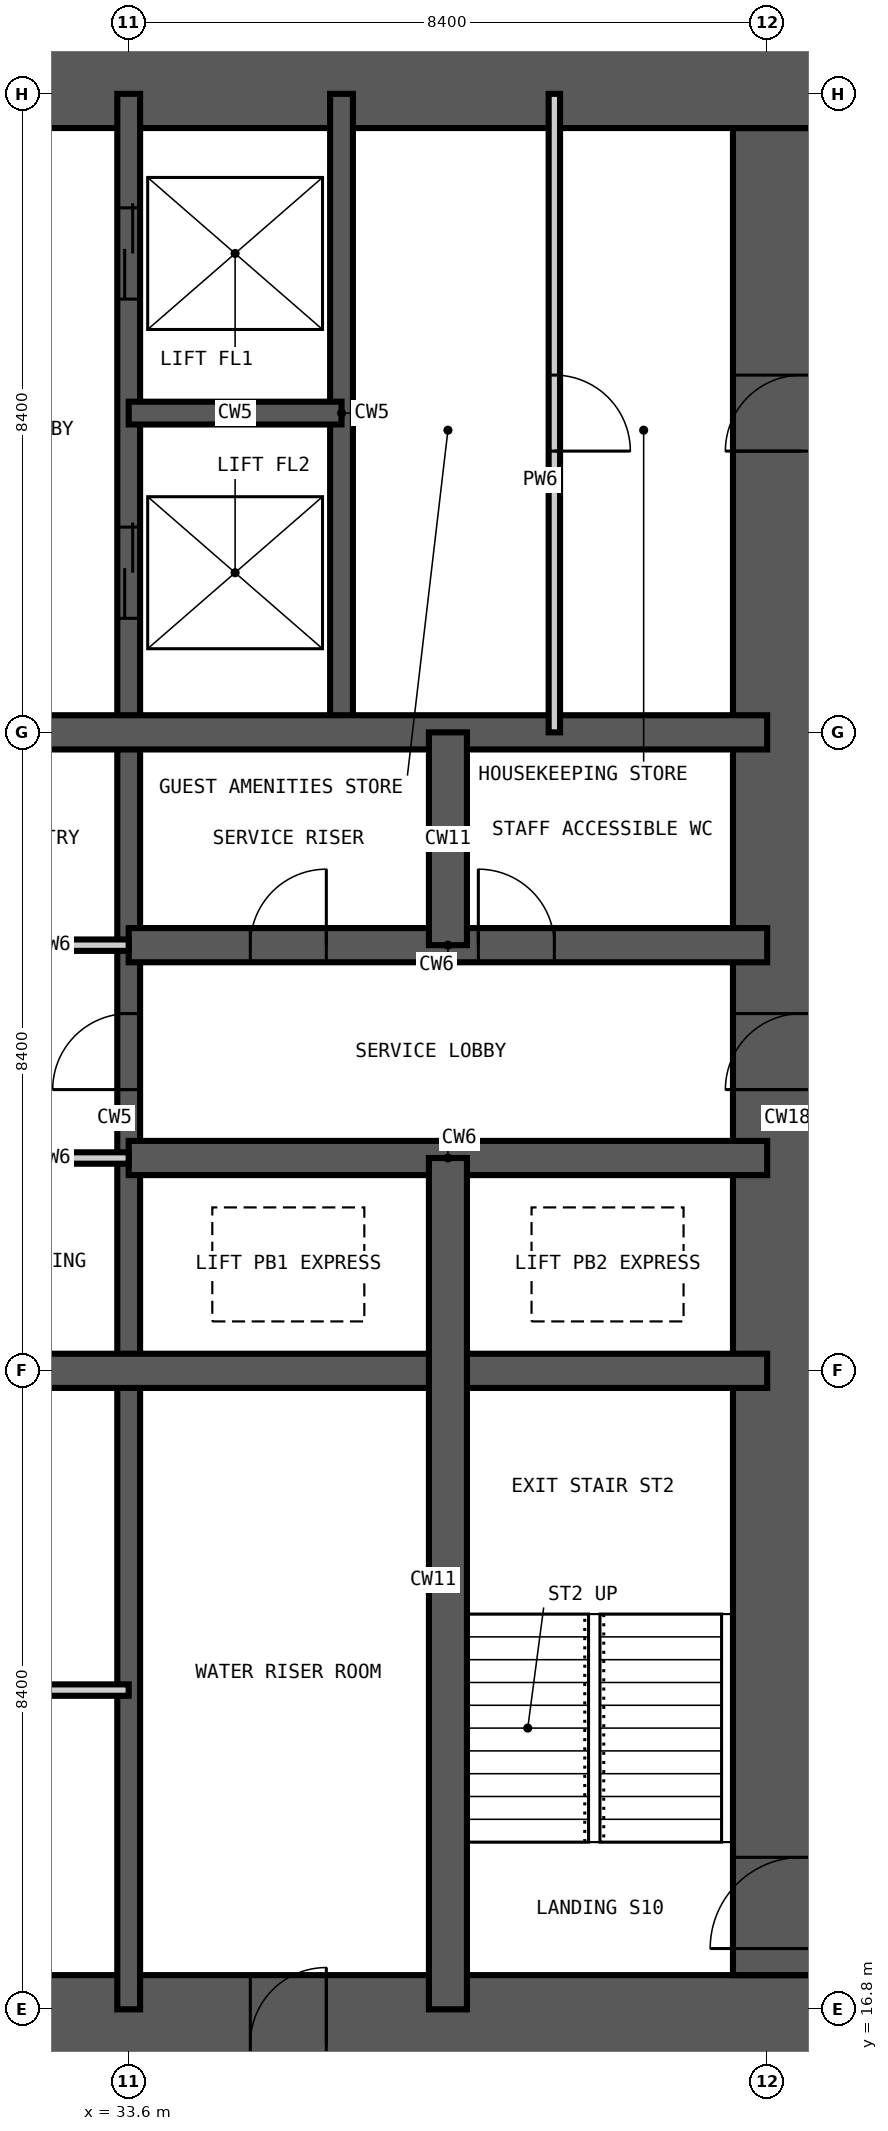
"""IFC4 building model, lengths in metres.
Left out: names, types, materials, properties, quantities, classifications, styles, units other than length and angle.
Written with IfcOpenShell. Run it as: python <this file> out.ifc"""

import sys

from ifc_helpers import new_model, si_unit, direction, frame, frame_2d, origin, place, context, subcontext, project, spatial, rectangle, extrude, element, fill, save


model = new_model("IFC4")
c1 = context("Model", 3, precision=1e-05, world=origin(), true_north=direction((0.0, 1.0)))
c2 = subcontext(c1, "Body", "Model", "MODEL_VIEW")
j1 = project(units=[si_unit("LENGTHUNIT", "METRE"), si_unit("PLANEANGLEUNIT", "RADIAN")], contexts=[c1])
p1 = place(None, origin())
s1 = spatial("IfcSite", under=j1, at=p1, CompositionType="ELEMENT")
p2 = place(p1, origin())
s2 = spatial("IfcBuilding", under=s1, at=p2, CompositionType="ELEMENT")
p3 = place(p2, frame((0.0, 0.0, 34.2)))
s3 = spatial("IfcBuildingStorey", under=s2, at=p3, CompositionType="ELEMENT", Elevation=34.2)
p4 = place(p3, frame((15.45, 16.35, -0.35), z_axis=(0.0, 0.0, 1.0), x_axis=(1.0, 0.0, 0.0)))
e1 = element("IfcWall", 1, at=p4, inside=s3, PredefinedType="SHEAR", context=c2, shape_type="SweptSolid", body=[
    extrude(rectangle(XDim=27.9, YDim=1.8, at=frame_2d((13.95, 0.0))), origin(), (0.0, 0.0, 1.0), 3.6),
])
p5 = place(p4, frame((13.45, 0.0, 0.35)))
e2 = element("IfcOpeningElement", 2, at=p5, cuts=e1, PredefinedType="OPENING", context=c2, shape_type="SweptSolid", body=[
    extrude(rectangle(XDim=1.0, YDim=2.1, at=frame_2d((0.5, 1.05))), frame((0.0, 0.91, 0.0), z_axis=(0.0, -1.0, 0.0), x_axis=(1.0, 0.0, 0.0)), (0.0, 0.0, 1.0), 1.82),
])
p6 = place(p4, frame((19.75, 0.0, 0.35)))
e3 = element("IfcOpeningElement", 3, at=p6, cuts=e1, PredefinedType="OPENING", context=c2, shape_type="SweptSolid", body=[
    extrude(rectangle(XDim=1.0, YDim=2.1, at=frame_2d((0.5, 1.05))), frame((0.0, 0.91, 0.0), z_axis=(0.0, -1.0, 0.0), x_axis=(1.0, 0.0, 0.0)), (0.0, 0.0, 1.0), 1.82),
])
p7 = place(p3, frame((42.45, 17.25, -0.35), z_axis=(0.0, 0.0, 1.0), x_axis=(0.0, 1.0, 0.0)))
e4 = element("IfcWall", 4, at=p7, inside=s3, PredefinedType="SHEAR", context=c2, shape_type="SweptSolid", body=[
    extrude(rectangle(XDim=24.3, YDim=1.8, at=frame_2d((12.15, 0.0))), origin(), (0.0, 0.0, 1.0), 3.6),
])
p8 = place(p7, frame((0.35, 0.0, 0.35)))
e5 = element("IfcOpeningElement", 5, at=p8, cuts=e4, PredefinedType="OPENING", context=c2, shape_type="SweptSolid", body=[
    extrude(rectangle(XDim=1.2, YDim=2.2, at=frame_2d((0.6, 1.1))), frame((0.0, 0.91, 0.0), z_axis=(0.0, -1.0, 0.0), x_axis=(1.0, 0.0, 0.0)), (0.0, 0.0, 1.0), 1.82),
])
p9 = place(p7, frame((11.65, 0.0, 0.35)))
e6 = element("IfcOpeningElement", 6, at=p9, cuts=e4, PredefinedType="OPENING", context=c2, shape_type="SweptSolid", body=[
    extrude(rectangle(XDim=1.0, YDim=2.1, at=frame_2d((0.5, 1.05))), frame((0.0, 0.91, 0.0), z_axis=(0.0, -1.0, 0.0), x_axis=(1.0, 0.0, 0.0)), (0.0, 0.0, 1.0), 1.82),
])
p10 = place(p7, frame((20.05, 0.0, 0.35)))
e7 = element("IfcOpeningElement", 7, at=p10, cuts=e4, PredefinedType="OPENING", context=c2, shape_type="SweptSolid", body=[
    extrude(rectangle(XDim=1.0, YDim=2.1, at=frame_2d((0.5, 1.05))), frame((0.0, 0.91, 0.0), z_axis=(0.0, -1.0, 0.0), x_axis=(1.0, 0.0, 0.0)), (0.0, 0.0, 1.0), 1.82),
])
p11 = place(p3, frame((43.35, 42.45, -0.35), z_axis=(0.0, 0.0, 1.0), x_axis=(-1.0, 0.0, 0.0)))
e8 = element("IfcWall", 8, at=p11, inside=s3, PredefinedType="SHEAR", context=c2, shape_type="SweptSolid", body=[
    extrude(rectangle(XDim=27.9, YDim=1.8, at=frame_2d((13.95, 0.0))), origin(), (0.0, 0.0, 1.0), 3.6),
])
p12 = place(p11, frame((21.85, 0.0, 0.35)))
e9 = element("IfcOpeningElement", 9, at=p12, cuts=e8, PredefinedType="OPENING", context=c2, shape_type="SweptSolid", body=[
    extrude(rectangle(XDim=1.0, YDim=2.1, at=frame_2d((0.5, 1.05))), frame((0.0, 0.91, 0.0), z_axis=(0.0, -1.0, 0.0), x_axis=(1.0, 0.0, 0.0)), (0.0, 0.0, 1.0), 1.82),
])
p13 = place(p11, frame((11.25, 0.0, 0.35)))
e10 = element("IfcOpeningElement", 10, at=p13, cuts=e8, PredefinedType="OPENING", context=c2, shape_type="SweptSolid", body=[
    extrude(rectangle(XDim=1.2, YDim=2.2, at=frame_2d((0.6, 1.1))), frame((0.0, 0.91, 0.0), z_axis=(0.0, -1.0, 0.0), x_axis=(1.0, 0.0, 0.0)), (0.0, 0.0, 1.0), 1.82),
])
p14 = place(p3, frame((33.6, 16.8, -0.35), z_axis=(0.0, 0.0, 1.0), x_axis=(0.0, 1.0, 0.0)))
e11 = element("IfcWall", 11, at=p14, inside=s3, PredefinedType="SHEAR", context=c2, shape_type="SweptSolid", body=[
    extrude(rectangle(XDim=25.2, YDim=0.3, at=frame_2d((12.6, 0.0))), origin(), (0.0, 0.0, 1.0), 3.6),
])
p15 = place(p14, frame((22.5, 0.0, 0.35)))
e12 = element("IfcOpeningElement", 12, at=p15, cuts=e11, PredefinedType="OPENING", context=c2, shape_type="SweptSolid", body=[
    extrude(rectangle(XDim=1.2, YDim=2.2, at=frame_2d((0.6, 1.1))), frame((0.0, 0.16, 0.0), z_axis=(0.0, -1.0, 0.0), x_axis=(1.0, 0.0, 0.0)), (0.0, 0.0, 1.0), 0.32),
])
p16 = place(p14, frame((18.3, 0.0, 0.35)))
e13 = element("IfcOpeningElement", 13, at=p16, cuts=e11, PredefinedType="OPENING", context=c2, shape_type="SweptSolid", body=[
    extrude(rectangle(XDim=1.2, YDim=2.2, at=frame_2d((0.6, 1.1))), frame((0.0, 0.16, 0.0), z_axis=(0.0, -1.0, 0.0), x_axis=(1.0, 0.0, 0.0)), (0.0, 0.0, 1.0), 0.32),
])
p17 = place(p14, frame((12.1, 0.0, 0.35)))
e14 = element("IfcOpeningElement", 14, at=p17, cuts=e11, PredefinedType="OPENING", context=c2, shape_type="SweptSolid", body=[
    extrude(rectangle(XDim=1.0, YDim=2.1, at=frame_2d((0.5, 1.05))), frame((0.0, 0.16, 0.0), z_axis=(0.0, -1.0, 0.0), x_axis=(1.0, 0.0, 0.0)), (0.0, 0.0, 1.0), 0.32),
])
p18 = place(p3, frame((36.4, 33.6, -0.35), z_axis=(0.0, 0.0, 1.0), x_axis=(0.0, 1.0, 0.0)))
e15 = element("IfcWall", 15, at=p18, inside=s3, PredefinedType="SHEAR", context=c2, shape_type="SweptSolid", body=[
    extrude(rectangle(XDim=8.4, YDim=0.3, at=frame_2d((4.2, 0.0))), origin(), (0.0, 0.0, 1.0), 3.6),
])
p19 = place(p3, frame((33.6, 37.8, -0.35), z_axis=(0.0, 0.0, 1.0), x_axis=(1.0, 0.0, 0.0)))
e16 = element("IfcWall", 16, at=p19, inside=s3, PredefinedType="SHEAR", context=c2, shape_type="SweptSolid", body=[
    extrude(rectangle(XDim=2.8, YDim=0.3, at=frame_2d((1.4, 0.0))), origin(), (0.0, 0.0, 1.0), 3.6),
])
p20 = place(p3, frame((16.8, 25.2, -0.35), z_axis=(0.0, 0.0, 1.0), x_axis=(1.0, 0.0, 0.0)))
e17 = element("IfcWall", 17, at=p20, inside=s3, PredefinedType="SHEAR", context=c2, shape_type="SweptSolid", body=[
    extrude(rectangle(XDim=25.2, YDim=0.45, at=frame_2d((12.6, 0.0))), origin(), (0.0, 0.0, 1.0), 3.6),
])
p21 = place(p3, frame((33.6, 28.0, -0.35), z_axis=(0.0, 0.0, 1.0), x_axis=(1.0, 0.0, 0.0)))
e18 = element("IfcWall", 18, at=p21, inside=s3, PredefinedType="SHEAR", context=c2, shape_type="SweptSolid", body=[
    extrude(rectangle(XDim=8.4, YDim=0.45, at=frame_2d((4.2, 0.0))), origin(), (0.0, 0.0, 1.0), 3.6),
])
p22 = place(p3, frame((33.6, 30.8, -0.35), z_axis=(0.0, 0.0, 1.0), x_axis=(1.0, 0.0, 0.0)))
e19 = element("IfcWall", 19, at=p22, inside=s3, PredefinedType="SHEAR", context=c2, shape_type="SweptSolid", body=[
    extrude(rectangle(XDim=8.4, YDim=0.45, at=frame_2d((4.2, 0.0))), origin(), (0.0, 0.0, 1.0), 3.6),
])
p23 = place(p22, frame((1.6, 0.0, 0.35)))
e20 = element("IfcOpeningElement", 20, at=p23, cuts=e19, PredefinedType="OPENING", context=c2, shape_type="SweptSolid", body=[
    extrude(rectangle(XDim=1.0, YDim=2.1, at=frame_2d((0.5, 1.05))), frame((0.0, 0.235, 0.0), z_axis=(0.0, -1.0, 0.0), x_axis=(1.0, 0.0, 0.0)), (0.0, 0.0, 1.0), 0.47),
])
p24 = place(p22, frame((4.6, 0.0, 0.35)))
e21 = element("IfcOpeningElement", 21, at=p24, cuts=e19, PredefinedType="OPENING", context=c2, shape_type="SweptSolid", body=[
    extrude(rectangle(XDim=1.0, YDim=2.1, at=frame_2d((0.5, 1.05))), frame((0.0, 0.235, 0.0), z_axis=(0.0, -1.0, 0.0), x_axis=(1.0, 0.0, 0.0)), (0.0, 0.0, 1.0), 0.47),
])
p25 = place(p3, frame((16.8, 33.6, -0.35), z_axis=(0.0, 0.0, 1.0), x_axis=(1.0, 0.0, 0.0)))
e22 = element("IfcWall", 22, at=p25, inside=s3, PredefinedType="SHEAR", context=c2, shape_type="SweptSolid", body=[
    extrude(rectangle(XDim=25.2, YDim=0.45, at=frame_2d((12.6, 0.0))), origin(), (0.0, 0.0, 1.0), 3.6),
])
p26 = place(p3, frame((37.8, 16.8, -0.35), z_axis=(0.0, 0.0, 1.0), x_axis=(0.0, 1.0, 0.0)))
e23 = element("IfcWall", 23, at=p26, inside=s3, PredefinedType="SHEAR", context=c2, shape_type="SweptSolid", body=[
    extrude(rectangle(XDim=11.2, YDim=0.5, at=frame_2d((5.6, 0.0))), origin(), (0.0, 0.0, 1.0), 3.6),
])
p27 = place(p3, frame((37.8, 30.8, -0.35), z_axis=(0.0, 0.0, 1.0), x_axis=(0.0, 1.0, 0.0)))
e24 = element("IfcWall", 24, at=p27, inside=s3, PredefinedType="SHEAR", context=c2, shape_type="SweptSolid", body=[
    extrude(rectangle(XDim=2.8, YDim=0.5, at=frame_2d((1.4, 0.0))), origin(), (0.0, 0.0, 1.0), 3.6),
])
p28 = place(p3, frame((39.2, 33.6, 0.0), z_axis=(0.0, 0.0, 1.0), x_axis=(0.0, 1.0, 0.0)))
e25 = element("IfcWall", 25, at=p28, inside=s3, PredefinedType="PARTITIONING", context=c2, shape_type="SweptSolid", body=[
    extrude(rectangle(XDim=8.4, YDim=0.15, at=frame_2d((4.2, 0.0))), origin(), (0.0, 0.0, 1.0), 3.25),
])
p29 = place(p28, frame((3.7, 0.0, 0.0)))
e26 = element("IfcOpeningElement", 26, at=p29, cuts=e25, PredefinedType="OPENING", context=c2, shape_type="SweptSolid", body=[
    extrude(rectangle(XDim=1.0, YDim=2.1, at=frame_2d((0.5, 1.05))), frame((0.0, 0.085, 0.0), z_axis=(0.0, -1.0, 0.0), x_axis=(1.0, 0.0, 0.0)), (0.0, 0.0, 1.0), 0.17),
])
p30 = place(p3, frame((25.2, 21.0, 0.0), z_axis=(0.0, 0.0, 1.0), x_axis=(1.0, 0.0, 0.0)))
e27 = element("IfcWall", 27, at=p30, inside=s3, PredefinedType="PARTITIONING", context=c2, shape_type="SweptSolid", body=[
    extrude(rectangle(XDim=8.4, YDim=0.15, at=frame_2d((4.2, 0.0))), origin(), (0.0, 0.0, 1.0), 3.25),
])
p31 = place(p30, frame((3.7, 0.0, 0.0)))
e28 = element("IfcOpeningElement", 28, at=p31, cuts=e27, PredefinedType="OPENING", context=c2, shape_type="SweptSolid", body=[
    extrude(rectangle(XDim=1.0, YDim=2.1, at=frame_2d((0.5, 1.05))), frame((0.0, 0.085, 0.0), z_axis=(0.0, -1.0, 0.0), x_axis=(1.0, 0.0, 0.0)), (0.0, 0.0, 1.0), 0.17),
])
p32 = place(p3, frame((29.4, 28.0, 0.0), z_axis=(0.0, 0.0, 1.0), x_axis=(1.0, 0.0, 0.0)))
e29 = element("IfcWall", 29, at=p32, inside=s3, PredefinedType="PARTITIONING", context=c2, shape_type="SweptSolid", body=[
    extrude(rectangle(XDim=4.2, YDim=0.15, at=frame_2d((2.1, 0.0))), origin(), (0.0, 0.0, 1.0), 3.25),
])
p33 = place(p32, frame((1.6, 0.0, 0.0)))
e30 = element("IfcOpeningElement", 30, at=p33, cuts=e29, PredefinedType="OPENING", context=c2, shape_type="SweptSolid", body=[
    extrude(rectangle(XDim=1.0, YDim=2.1, at=frame_2d((0.5, 1.05))), frame((0.0, 0.085, 0.0), z_axis=(0.0, -1.0, 0.0), x_axis=(1.0, 0.0, 0.0)), (0.0, 0.0, 1.0), 0.17),
])
p34 = place(p3, frame((29.4, 30.8, 0.0), z_axis=(0.0, 0.0, 1.0), x_axis=(1.0, 0.0, 0.0)))
e31 = element("IfcWall", 31, at=p34, inside=s3, PredefinedType="PARTITIONING", context=c2, shape_type="SweptSolid", body=[
    extrude(rectangle(XDim=4.2, YDim=0.15, at=frame_2d((2.1, 0.0))), origin(), (0.0, 0.0, 1.0), 3.25),
])
p35 = place(p34, frame((1.6, 0.0, 0.0)))
e32 = element("IfcOpeningElement", 32, at=p35, cuts=e31, PredefinedType="OPENING", context=c2, shape_type="SweptSolid", body=[
    extrude(rectangle(XDim=1.0, YDim=2.1, at=frame_2d((0.5, 1.05))), frame((0.0, 0.085, 0.0), z_axis=(0.0, -1.0, 0.0), x_axis=(1.0, 0.0, 0.0)), (0.0, 0.0, 1.0), 0.17),
])
p36 = place(p8, origin())
e33 = element("IfcDoor", 33, at=p36, inside=s3, OperationType="SINGLE_SWING_LEFT", PredefinedType="DOOR", context=c2, shape_type="SweptSolid", body=[
    extrude(rectangle(XDim=1.2, YDim=2.2, at=frame_2d((0.6, 1.1))), frame((0.0, 0.025, 0.0), z_axis=(0.0, -1.0, 0.0), x_axis=(1.0, 0.0, 0.0)), (0.0, 0.0, 1.0), 0.05),
])
fill(e5, e33)
p37 = place(p15, origin())
e34 = element("IfcDoor", 34, at=p37, inside=s3, OperationType="DOUBLE_DOOR_SLIDING", PredefinedType="DOOR", context=c2, shape_type="SweptSolid", body=[
    extrude(rectangle(XDim=1.2, YDim=2.2, at=frame_2d((0.6, 1.1))), frame((0.0, 0.025, 0.0), z_axis=(0.0, -1.0, 0.0), x_axis=(1.0, 0.0, 0.0)), (0.0, 0.0, 1.0), 0.05),
])
fill(e12, e34)
p38 = place(p16, origin())
e35 = element("IfcDoor", 35, at=p38, inside=s3, OperationType="DOUBLE_DOOR_SLIDING", PredefinedType="DOOR", context=c2, shape_type="SweptSolid", body=[
    extrude(rectangle(XDim=1.2, YDim=2.2, at=frame_2d((0.6, 1.1))), frame((0.0, 0.025, 0.0), z_axis=(0.0, -1.0, 0.0), x_axis=(1.0, 0.0, 0.0)), (0.0, 0.0, 1.0), 0.05),
])
fill(e13, e35)
p39 = place(p17, origin())
e36 = element("IfcDoor", 36, at=p39, inside=s3, OperationType="SINGLE_SWING_LEFT", PredefinedType="DOOR", context=c2, shape_type="SweptSolid", body=[
    extrude(rectangle(XDim=1.0, YDim=2.1, at=frame_2d((0.5, 1.05))), frame((0.0, 0.025, 0.0), z_axis=(0.0, -1.0, 0.0), x_axis=(1.0, 0.0, 0.0)), (0.0, 0.0, 1.0), 0.05),
])
fill(e14, e36)
p40 = place(p23, origin())
e37 = element("IfcDoor", 37, at=p40, inside=s3, OperationType="SINGLE_SWING_RIGHT", PredefinedType="DOOR", context=c2, shape_type="SweptSolid", body=[
    extrude(rectangle(XDim=1.0, YDim=2.1, at=frame_2d((0.5, 1.05))), frame((0.0, 0.025, 0.0), z_axis=(0.0, -1.0, 0.0), x_axis=(1.0, 0.0, 0.0)), (0.0, 0.0, 1.0), 0.05),
])
fill(e20, e37)
p41 = place(p24, origin())
e38 = element("IfcDoor", 38, at=p41, inside=s3, OperationType="SINGLE_SWING_LEFT", PredefinedType="DOOR", context=c2, shape_type="SweptSolid", body=[
    extrude(rectangle(XDim=1.0, YDim=2.1, at=frame_2d((0.5, 1.05))), frame((0.0, 0.025, 0.0), z_axis=(0.0, -1.0, 0.0), x_axis=(1.0, 0.0, 0.0)), (0.0, 0.0, 1.0), 0.05),
])
fill(e21, e38)
p42 = place(p9, origin())
e39 = element("IfcDoor", 39, at=p42, inside=s3, OperationType="SINGLE_SWING_LEFT", PredefinedType="DOOR", context=c2, shape_type="SweptSolid", body=[
    extrude(rectangle(XDim=1.0, YDim=2.1, at=frame_2d((0.5, 1.05))), frame((0.0, 0.025, 0.0), z_axis=(0.0, -1.0, 0.0), x_axis=(1.0, 0.0, 0.0)), (0.0, 0.0, 1.0), 0.05),
])
fill(e6, e39)
p43 = place(p10, origin())
e40 = element("IfcDoor", 40, at=p43, inside=s3, OperationType="SINGLE_SWING_LEFT", PredefinedType="DOOR", context=c2, shape_type="SweptSolid", body=[
    extrude(rectangle(XDim=1.0, YDim=2.1, at=frame_2d((0.5, 1.05))), frame((0.0, 0.025, 0.0), z_axis=(0.0, -1.0, 0.0), x_axis=(1.0, 0.0, 0.0)), (0.0, 0.0, 1.0), 0.05),
])
fill(e7, e40)
p44 = place(p29, frame((1.0, 0.0, 0.0), z_axis=(0.0, 0.0, 1.0), x_axis=(-1.0, 0.0, 0.0)))
e41 = element("IfcDoor", 41, at=p44, inside=s3, OperationType="SINGLE_SWING_RIGHT", PredefinedType="DOOR", context=c2, shape_type="SweptSolid", body=[
    extrude(rectangle(XDim=1.0, YDim=2.1, at=frame_2d((0.5, 1.05))), frame((0.0, 0.025, 0.0), z_axis=(0.0, -1.0, 0.0), x_axis=(1.0, 0.0, 0.0)), (0.0, 0.0, 1.0), 0.05),
])
fill(e26, e41)
p45 = place(p6, origin())
e42 = element("IfcDoor", 42, at=p45, inside=s3, OperationType="SINGLE_SWING_RIGHT", PredefinedType="DOOR", context=c2, shape_type="SweptSolid", body=[
    extrude(rectangle(XDim=1.0, YDim=2.1, at=frame_2d((0.5, 1.05))), frame((0.0, 0.025, 0.0), z_axis=(0.0, -1.0, 0.0), x_axis=(1.0, 0.0, 0.0)), (0.0, 0.0, 1.0), 0.05),
])
fill(e3, e42)
save(model, sys.argv[1])
